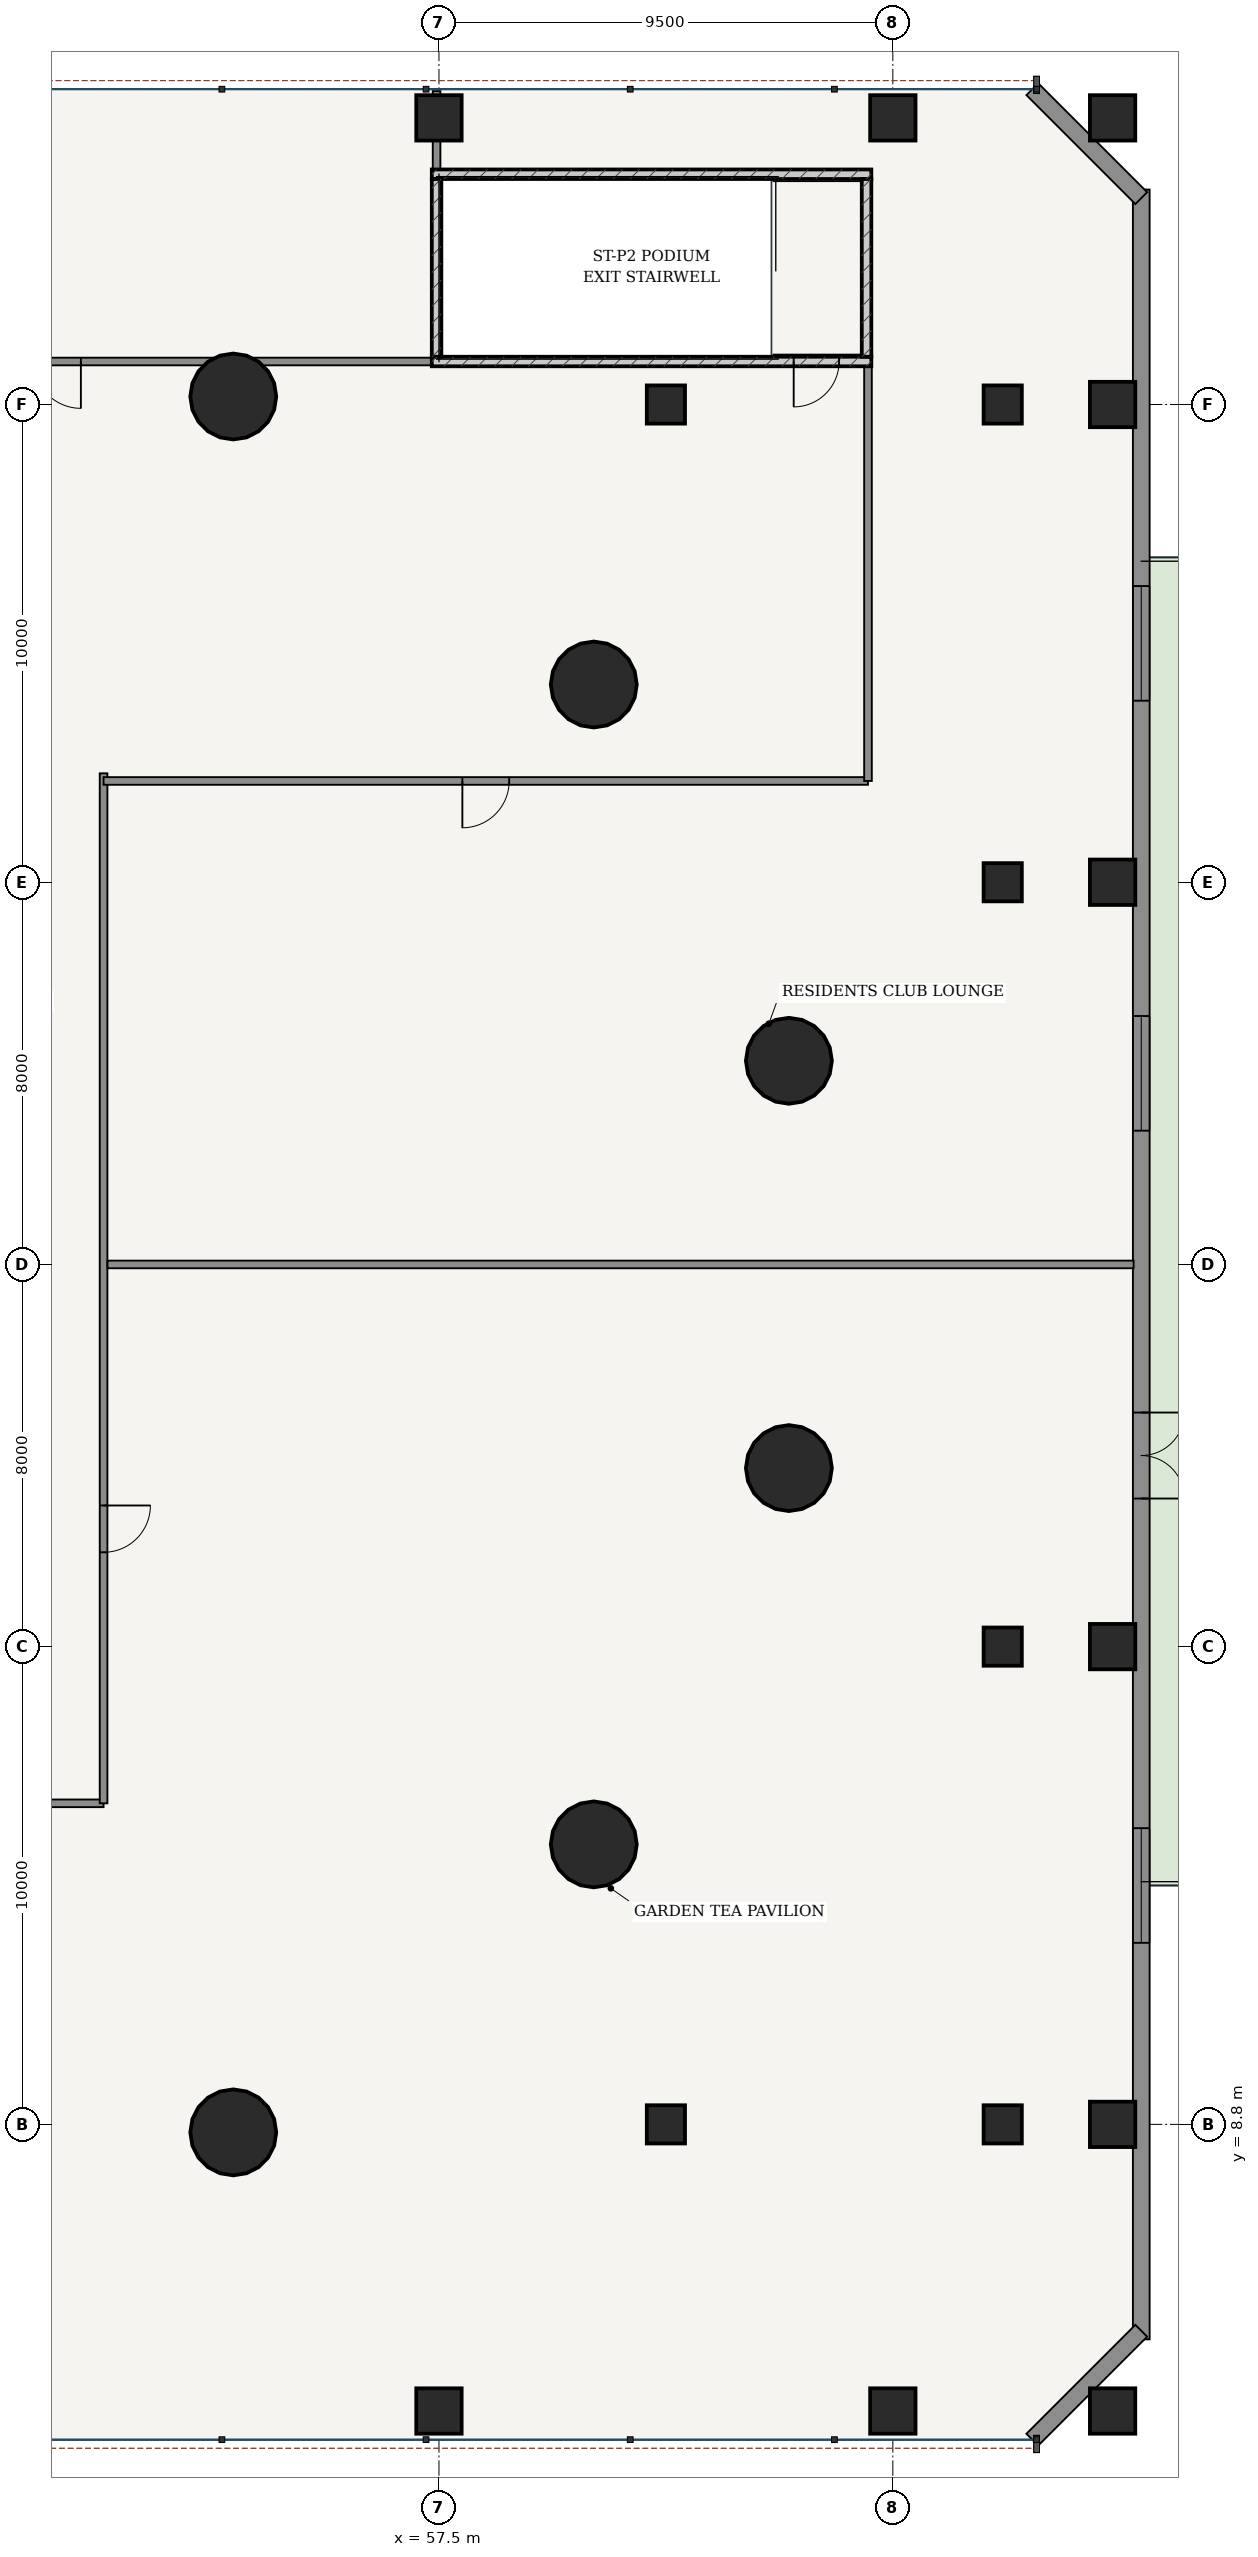
"""IFC4 building model, lengths in metres.
Left out: names, types, materials, properties, quantities, classifications, styles, units other than length and angle.
Written with IfcOpenShell. Run it as: python <this file> out.ifc"""

import sys

from ifc_helpers import new_model, si_unit, direction, frame, frame_2d, origin, origin_2d, place, context, subcontext, project, spatial, rectangle, hollow_circle, extrude, source, transform, mapped, element, fill, save


model = new_model("IFC4")
c1 = context("Model", 3, precision=1e-05, world=origin(), true_north=direction((-0.2419218956, 0.970295726276)))
c2 = subcontext(c1, "Body", "Model", "MODEL_VIEW")
j1 = project(units=[si_unit("LENGTHUNIT", "METRE"), si_unit("PLANEANGLEUNIT", "RADIAN")], contexts=[c1])
p1 = place(None, origin())
s1 = spatial("IfcSite", under=j1, at=p1, CompositionType="ELEMENT")
p2 = place(p1, origin())
s2 = spatial("IfcBuilding", under=s1, at=p2, CompositionType="ELEMENT")
p3 = place(p2, frame((0.0, 0.0, 18.9)))
s3 = spatial("IfcBuildingStorey", under=s2, at=p3, CompositionType="ELEMENT", Elevation=18.9)
p4 = place(p3, frame((57.35, 45.7, 0.0), z_axis=(0.0, 0.0, 1.0), x_axis=(1.0, 0.0, 0.0)))
e1 = element("IfcWall", 1, at=p4, inside=s3, PredefinedType="SOLIDWALL", context=c2, shape_type="SweptSolid", body=[
    extrude(rectangle(XDim=9.2, YDim=0.2, at=frame_2d((4.6, 0.0))), origin(), (0.0, 0.0, 1.0), 4.82),
])
p5 = place(p4, frame((7.575, 0.0, 0.0)))
e2 = element("IfcOpeningElement", 2, at=p5, cuts=e1, PredefinedType="OPENING", context=c2, shape_type="SweptSolid", body=[
    extrude(rectangle(XDim=0.95, YDim=2.15, at=frame_2d((0.475, 1.075))), frame((0.0, 0.11, 0.0), z_axis=(0.0, -1.0, 0.0), x_axis=(1.0, 0.0, 0.0)), (0.0, 0.0, 1.0), 0.22),
])
p6 = place(p3, frame((57.35, 49.62, 0.0), z_axis=(0.0, 0.0, 1.0), x_axis=(1.0, 0.0, 0.0)))
e3 = element("IfcWall", 3, at=p6, inside=s3, PredefinedType="SOLIDWALL", context=c2, shape_type="SweptSolid", body=[
    extrude(rectangle(XDim=9.2, YDim=0.2, at=frame_2d((4.6, 0.0))), origin(), (0.0, 0.0, 1.0), 4.82),
])
for number, where, z_axis, x_axis in (
    (4, (57.45, 45.8, 0.0), (0.0, 0.0, 1.0), (0.0, 1.0, 0.0)),
    (5, (66.45, 45.8, 0.0), (0.0, 0.0, 1.0), (0.0, 1.0, 0.0)),
):
    element("IfcWall", number, at=place(p3, frame(where, z_axis=z_axis, x_axis=x_axis)), inside=s3, PredefinedType="SOLIDWALL", context=c2, shape_type="SweptSolid", body=[
        extrude(rectangle(XDim=3.72, YDim=0.2, at=frame_2d((1.86, 0.0))), origin(), (0.0, 0.0, 1.0), 4.82),
    ])
for number, where, z_axis, x_axis in (
    (6, (64.824, 31.063, 0.0), (0.0, 0.0, 1.0), (1.0, 0.0, 0.0)),
    (7, (60.741, 38.939, 0.0), (0.0, 0.0, 1.0), (1.0, 0.0, 0.0)),
    (8, (53.195, 44.968, 0.0), (0.0, 0.0, 1.0), (1.0, 0.0, 0.0)),
    (9, (53.195, 8.632, 0.0), (0.0, 0.0, 1.0), (1.0, 0.0, 0.0)),
    (10, (60.741, 14.661, 0.0), (0.0, 0.0, 1.0), (1.0, 0.0, 0.0)),
    (11, (64.824, 22.537, 0.0), (0.0, 0.0, 1.0), (1.0, 0.0, 0.0)),
):
    element("IfcColumn", number, at=place(p3, frame(where, z_axis=z_axis, x_axis=x_axis)), inside=s3, PredefinedType="COLUMN", context=c2, shape_type="SweptSolid", body=[
        extrude(hollow_circle(Radius=0.9, WallThickness=0.055, at=origin_2d()), origin(), (0.0, 0.0, 1.0), 5.1),
    ])
for number, where, z_axis, x_axis in (
    (12, (57.5, 2.8, 0.0), (0.0, 0.0, 1.0), (1.0, 0.0, 0.0)),
    (13, (57.5, 50.8, 0.0), (0.0, 0.0, 1.0), (1.0, 0.0, 0.0)),
    (14, (67.0, 2.8, 0.0), (0.0, 0.0, 1.0), (1.0, 0.0, 0.0)),
    (15, (67.0, 50.8, 0.0), (0.0, 0.0, 1.0), (1.0, 0.0, 0.0)),
    (16, (71.6, 2.8, 0.0), (0.0, 0.0, 1.0), (1.0, 0.0, 0.0)),
    (17, (71.6, 8.8, 0.0), (0.0, 0.0, 1.0), (1.0, 0.0, 0.0)),
    (18, (71.6, 18.8, 0.0), (0.0, 0.0, 1.0), (1.0, 0.0, 0.0)),
    (19, (71.6, 34.8, 0.0), (0.0, 0.0, 1.0), (1.0, 0.0, 0.0)),
    (20, (71.6, 44.8, 0.0), (0.0, 0.0, 1.0), (1.0, 0.0, 0.0)),
    (21, (71.6, 50.8, 0.0), (0.0, 0.0, 1.0), (1.0, 0.0, 0.0)),
):
    element("IfcColumn", number, at=place(p3, frame(where, z_axis=z_axis, x_axis=x_axis)), inside=s3, PredefinedType="COLUMN", context=c2, shape_type="SweptSolid", body=[
        extrude(rectangle(XDim=0.95, YDim=0.95, at=origin_2d()), origin(), (0.0, 0.0, 1.0), 5.1),
    ])
for number, where, z_axis, x_axis in (
    (22, (69.3, 8.8, -0.45), (0.0, 0.0, 1.0), (1.0, 0.0, 0.0)),
    (23, (62.25, 8.8, -0.45), (0.0, 0.0, 1.0), (1.0, 0.0, 0.0)),
    (24, (69.3, 18.8, -0.45), (0.0, 0.0, 1.0), (1.0, 0.0, 0.0)),
    (25, (69.3, 34.8, -0.45), (0.0, 0.0, 1.0), (1.0, 0.0, 0.0)),
    (26, (69.3, 44.8, -0.45), (0.0, 0.0, 1.0), (1.0, 0.0, 0.0)),
    (27, (62.25, 44.8, -0.45), (0.0, 0.0, 1.0), (1.0, 0.0, 0.0)),
):
    element("IfcColumn", number, at=place(p3, frame(where, z_axis=z_axis, x_axis=x_axis)), inside=s3, PredefinedType="COLUMN", context=c2, shape_type="SweptSolid", body=[
        extrude(rectangle(XDim=0.8, YDim=0.8, at=origin_2d()), origin(), (0.0, 0.0, 1.0), 5.55),
    ])
p7 = place(p3, frame((72.2, 4.3, 0.0), z_axis=(0.0, 0.0, 1.0), x_axis=(0.0, 1.0, 0.0)))
e28 = element("IfcWall", 28, at=p7, inside=s3, PredefinedType="SOLIDWALL", context=c2, shape_type="SweptSolid", body=[
    extrude(rectangle(XDim=45.0, YDim=0.35, at=frame_2d((22.5, 0.0))), origin(), (0.0, 0.0, 1.0), 4.82),
])
p8 = place(p7, frame((8.3, 0.0, 0.85)))
e29 = element("IfcOpeningElement", 29, at=p8, cuts=e28, PredefinedType="OPENING", context=c2, shape_type="SweptSolid", body=[
    extrude(rectangle(XDim=2.4, YDim=2.2, at=frame_2d((1.2, 1.1))), frame((0.0, 0.185, 0.0), z_axis=(0.0, -1.0, 0.0), x_axis=(1.0, 0.0, 0.0)), (0.0, 0.0, 1.0), 0.37),
])
p9 = place(p7, frame((25.3, 0.0, 0.85)))
e30 = element("IfcOpeningElement", 30, at=p9, cuts=e28, PredefinedType="OPENING", context=c2, shape_type="SweptSolid", body=[
    extrude(rectangle(XDim=2.4, YDim=2.2, at=frame_2d((1.2, 1.1))), frame((0.0, 0.185, 0.0), z_axis=(0.0, -1.0, 0.0), x_axis=(1.0, 0.0, 0.0)), (0.0, 0.0, 1.0), 0.37),
])
p10 = place(p7, frame((34.3, 0.0, 0.85)))
e31 = element("IfcOpeningElement", 31, at=p10, cuts=e28, PredefinedType="OPENING", context=c2, shape_type="SweptSolid", body=[
    extrude(rectangle(XDim=2.4, YDim=2.2, at=frame_2d((1.2, 1.1))), frame((0.0, 0.185, 0.0), z_axis=(0.0, -1.0, 0.0), x_axis=(1.0, 0.0, 0.0)), (0.0, 0.0, 1.0), 0.37),
])
p11 = place(p7, frame((17.6, 0.0, 0.0)))
e32 = element("IfcOpeningElement", 32, at=p11, cuts=e28, PredefinedType="OPENING", context=c2, shape_type="SweptSolid", body=[
    extrude(rectangle(XDim=1.8, YDim=2.4, at=frame_2d((0.9, 1.2))), frame((0.0, 0.185, 0.0), z_axis=(0.0, -1.0, 0.0), x_axis=(1.0, 0.0, 0.0)), (0.0, 0.0, 1.0), 0.37),
])
for number, where, z_axis, x_axis in (
    (33, (69.92, 2.2, 0.0), (0.0, 0.0, 1.0), (0.707, 0.707, 0.0)),
    (34, (72.2, 49.12, 0.0), (0.0, 0.0, 1.0), (-0.707, 0.707, 0.0)),
):
    element("IfcWall", number, at=place(p3, frame(where, z_axis=z_axis, x_axis=x_axis)), inside=s3, PredefinedType="SOLIDWALL", context=c2, shape_type="SweptSolid", body=[
        extrude(rectangle(XDim=3.224, YDim=0.35, at=frame_2d((1.612, 0.0))), origin(), (0.0, 0.0, 1.0), 3.855),
    ])
p12 = place(p3, frame((25.52, 15.52, 0.0), z_axis=(0.0, 0.0, 1.0), x_axis=(1.0, 0.0, 0.0)))
e35 = element("IfcWall", 35, at=p12, inside=s3, PredefinedType="PARTITIONING", context=c2, shape_type="SweptSolid", body=[
    extrude(rectangle(XDim=24.96, YDim=0.16, at=frame_2d((12.48, 0.0))), origin(), (0.0, 0.0, 1.0), 4.188),
])
p13 = place(p12, frame((5.854, 0.0, 0.0)))
e36 = element("IfcOpeningElement", 36, at=p13, cuts=e35, PredefinedType="OPENING", context=c2, shape_type="SweptSolid", body=[
    extrude(rectangle(XDim=0.98, YDim=2.2, at=frame_2d((0.49, 1.1))), frame((0.0, 0.09, 0.0), z_axis=(0.0, -1.0, 0.0), x_axis=(1.0, 0.0, 0.0)), (0.0, 0.0, 1.0), 0.18),
])
p14 = place(p12, frame((18.125, 0.0, 0.0)))
e37 = element("IfcOpeningElement", 37, at=p14, cuts=e35, PredefinedType="OPENING", context=c2, shape_type="SweptSolid", body=[
    extrude(rectangle(XDim=0.98, YDim=2.2, at=frame_2d((0.49, 1.1))), frame((0.0, 0.09, 0.0), z_axis=(0.0, -1.0, 0.0), x_axis=(1.0, 0.0, 0.0)), (0.0, 0.0, 1.0), 0.18),
])
p15 = place(p3, frame((50.48, 15.52, 0.0), z_axis=(0.0, 0.0, 1.0), x_axis=(0.0, 1.0, 0.0)))
e38 = element("IfcWall", 38, at=p15, inside=s3, PredefinedType="PARTITIONING", context=c2, shape_type="SweptSolid", body=[
    extrude(rectangle(XDim=21.56, YDim=0.16, at=frame_2d((10.78, 0.0))), origin(), (0.0, 0.0, 1.0), 4.188),
])
p16 = place(p15, frame((5.254, 0.0, 0.0)))
e39 = element("IfcOpeningElement", 39, at=p16, cuts=e38, PredefinedType="OPENING", context=c2, shape_type="SweptSolid", body=[
    extrude(rectangle(XDim=0.98, YDim=2.2, at=frame_2d((0.49, 1.1))), frame((0.0, 0.09, 0.0), z_axis=(0.0, -1.0, 0.0), x_axis=(1.0, 0.0, 0.0)), (0.0, 0.0, 1.0), 0.18),
])
p17 = place(p3, frame((50.48, 36.92, 0.0), z_axis=(0.0, 0.0, 1.0), x_axis=(1.0, 0.0, 0.0)))
e40 = element("IfcWall", 40, at=p17, inside=s3, PredefinedType="PARTITIONING", context=c2, shape_type="SweptSolid", body=[
    extrude(rectangle(XDim=16.0, YDim=0.16, at=frame_2d((8.0, 0.0))), origin(), (0.0, 0.0, 1.0), 4.188),
])
p18 = place(p17, frame((7.51, 0.0, 0.0)))
e41 = element("IfcOpeningElement", 41, at=p18, cuts=e40, PredefinedType="OPENING", context=c2, shape_type="SweptSolid", body=[
    extrude(rectangle(XDim=0.98, YDim=2.2, at=frame_2d((0.49, 1.1))), frame((0.0, 0.09, 0.0), z_axis=(0.0, -1.0, 0.0), x_axis=(1.0, 0.0, 0.0)), (0.0, 0.0, 1.0), 0.18),
])
p19 = place(p3, frame((66.48, 36.92, 0.0), z_axis=(0.0, 0.0, 1.0), x_axis=(0.0, 1.0, 0.0)))
e42 = element("IfcWall", 42, at=p19, inside=s3, PredefinedType="PARTITIONING", context=c2, shape_type="SweptSolid", body=[
    extrude(rectangle(XDim=8.78, YDim=0.16, at=frame_2d((4.39, 0.0))), origin(), (0.0, 0.0, 1.0), 4.82),
])
p20 = place(p3, frame((18.55, 45.7, 0.0), z_axis=(0.0, 0.0, 1.0), x_axis=(1.0, 0.0, 0.0)))
e43 = element("IfcWall", 43, at=p20, inside=s3, PredefinedType="PARTITIONING", context=c2, shape_type="SweptSolid", body=[
    extrude(rectangle(XDim=38.9, YDim=0.16, at=frame_2d((19.45, 0.0))), origin(), (0.0, 0.0, 1.0), 4.188),
])
p21 = place(p20, frame((7.505, 0.0, 0.0)))
e44 = element("IfcOpeningElement", 44, at=p21, cuts=e43, PredefinedType="OPENING", context=c2, shape_type="SweptSolid", body=[
    extrude(rectangle(XDim=0.86, YDim=2.1, at=frame_2d((0.43, 1.05))), frame((0.0, 0.09, 0.0), z_axis=(0.0, -1.0, 0.0), x_axis=(1.0, 0.0, 0.0)), (0.0, 0.0, 1.0), 0.18),
])
p22 = place(p20, frame((19.02, 0.0, 0.0)))
e45 = element("IfcOpeningElement", 45, at=p22, cuts=e43, PredefinedType="OPENING", context=c2, shape_type="SweptSolid", body=[
    extrude(rectangle(XDim=0.86, YDim=2.1, at=frame_2d((0.43, 1.05))), frame((0.0, 0.09, 0.0), z_axis=(0.0, -1.0, 0.0), x_axis=(1.0, 0.0, 0.0)), (0.0, 0.0, 1.0), 0.18),
])
p23 = place(p20, frame((30.475, 0.0, 0.0)))
e46 = element("IfcOpeningElement", 46, at=p23, cuts=e43, PredefinedType="OPENING", context=c2, shape_type="SweptSolid", body=[
    extrude(rectangle(XDim=0.98, YDim=2.2, at=frame_2d((0.49, 1.1))), frame((0.0, 0.09, 0.0), z_axis=(0.0, -1.0, 0.0), x_axis=(1.0, 0.0, 0.0)), (0.0, 0.0, 1.0), 0.18),
])
p24 = place(p3, frame((50.562, 26.8, 0.0), z_axis=(0.0, 0.0, 1.0), x_axis=(1.0, 0.0, 0.0)))
e47 = element("IfcWall", 47, at=p24, inside=s3, PredefinedType="PARTITIONING", context=c2, shape_type="SweptSolid", body=[
    extrude(rectangle(XDim=21.478, YDim=0.16, at=frame_2d((10.739, 0.0))), origin(), (0.0, 0.0, 1.0), 4.262),
])
p25 = place(p3, frame((57.45, 49.722, 0.0), z_axis=(0.0, 0.0, 1.0), x_axis=(0.0, 1.0, 0.0)))
e48 = element("IfcWall", 48, at=p25, inside=s3, PredefinedType="PARTITIONING", context=c2, shape_type="SweptSolid", body=[
    extrude(rectangle(XDim=1.638, YDim=0.16, at=frame_2d((0.819, 0.0))), origin(), (0.0, 0.0, 1.0), 3.855),
])
m1 = source(origin(), c2, "Body", "SweptSolid", [
    extrude(rectangle(XDim=2.4, YDim=2.2, at=frame_2d((1.2, 1.1))), frame((0.0, 0.03, 0.0), z_axis=(0.0, -1.0, 0.0), x_axis=(1.0, 0.0, 0.0)), (0.0, 0.0, 1.0), 0.06),
])
p26 = place(p8, origin())
e49 = element("IfcWindow", 49, at=p26, inside=s3, PartitioningType="SINGLE_PANEL", PredefinedType="WINDOW", context=c2, shape_type="MappedRepresentation", body=[
    mapped(m1, transform((0.0, 0.0, 0.0), scale=1.0)),
])
fill(e29, e49)
p27 = place(p9, origin())
e50 = element("IfcWindow", 50, at=p27, inside=s3, PartitioningType="SINGLE_PANEL", PredefinedType="WINDOW", context=c2, shape_type="MappedRepresentation", body=[
    mapped(m1, transform((0.0, 0.0, 0.0), scale=1.0)),
])
fill(e30, e50)
p28 = place(p10, origin())
e51 = element("IfcWindow", 51, at=p28, inside=s3, PartitioningType="SINGLE_PANEL", PredefinedType="WINDOW", context=c2, shape_type="MappedRepresentation", body=[
    mapped(m1, transform((0.0, 0.0, 0.0), scale=1.0)),
])
fill(e31, e51)
m2 = source(origin(), c2, "Body", "SweptSolid", [
    extrude(rectangle(XDim=1.8, YDim=2.4, at=frame_2d((0.9, 1.2))), frame((0.0, 0.025, 0.0), z_axis=(0.0, -1.0, 0.0), x_axis=(1.0, 0.0, 0.0)), (0.0, 0.0, 1.0), 0.05),
])
p29 = place(p11, frame((1.8, 0.0, 0.0), z_axis=(0.0, 0.0, 1.0), x_axis=(-1.0, 0.0, 0.0)))
e52 = element("IfcDoor", 52, at=p29, inside=s3, OperationType="DOUBLE_DOOR_SINGLE_SWING", PredefinedType="DOOR", context=c2, shape_type="MappedRepresentation", body=[
    mapped(m2, transform((0.0, 0.0, 0.0), scale=1.0)),
])
fill(e32, e52)
m3 = source(origin(), c2, "Body", "SweptSolid", [
    extrude(rectangle(XDim=0.95, YDim=2.15, at=frame_2d((0.475, 1.075))), frame((0.0, 0.025, 0.0), z_axis=(0.0, -1.0, 0.0), x_axis=(1.0, 0.0, 0.0)), (0.0, 0.0, 1.0), 0.05),
])
p30 = place(p5, frame((0.95, 0.0, 0.0), z_axis=(0.0, 0.0, 1.0), x_axis=(-1.0, 0.0, 0.0)))
e53 = element("IfcDoor", 53, at=p30, inside=s3, OperationType="SINGLE_SWING_RIGHT", PredefinedType="DOOR", context=c2, shape_type="MappedRepresentation", body=[
    mapped(m3, transform((0.0, 0.0, 0.0), scale=1.0)),
])
fill(e2, e53)
m4 = source(origin(), c2, "Body", "SweptSolid", [
    extrude(rectangle(XDim=0.98, YDim=2.2, at=frame_2d((0.49, 1.1))), frame((0.0, 0.025, 0.0), z_axis=(0.0, -1.0, 0.0), x_axis=(1.0, 0.0, 0.0)), (0.0, 0.0, 1.0), 0.05),
])
p31 = place(p16, frame((0.98, 0.0, 0.0), z_axis=(0.0, 0.0, 1.0), x_axis=(-1.0, 0.0, 0.0)))
e54 = element("IfcDoor", 54, at=p31, inside=s3, OperationType="SINGLE_SWING_LEFT", PredefinedType="DOOR", context=c2, shape_type="MappedRepresentation", body=[
    mapped(m4, transform((0.0, 0.0, 0.0), scale=1.0)),
])
fill(e39, e54)
p32 = place(p18, frame((0.98, 0.0, 0.0), z_axis=(0.0, 0.0, 1.0), x_axis=(-1.0, 0.0, 0.0)))
e55 = element("IfcDoor", 55, at=p32, inside=s3, OperationType="SINGLE_SWING_RIGHT", PredefinedType="DOOR", context=c2, shape_type="MappedRepresentation", body=[
    mapped(m4, transform((0.0, 0.0, 0.0), scale=1.0)),
])
fill(e41, e55)
p33 = place(p23, frame((0.98, 0.0, 0.0), z_axis=(0.0, 0.0, 1.0), x_axis=(-1.0, 0.0, 0.0)))
e56 = element("IfcDoor", 56, at=p33, inside=s3, OperationType="SINGLE_SWING_LEFT", PredefinedType="DOOR", context=c2, shape_type="MappedRepresentation", body=[
    mapped(m4, transform((0.0, 0.0, 0.0), scale=1.0)),
])
fill(e46, e56)
save(model, sys.argv[1])
